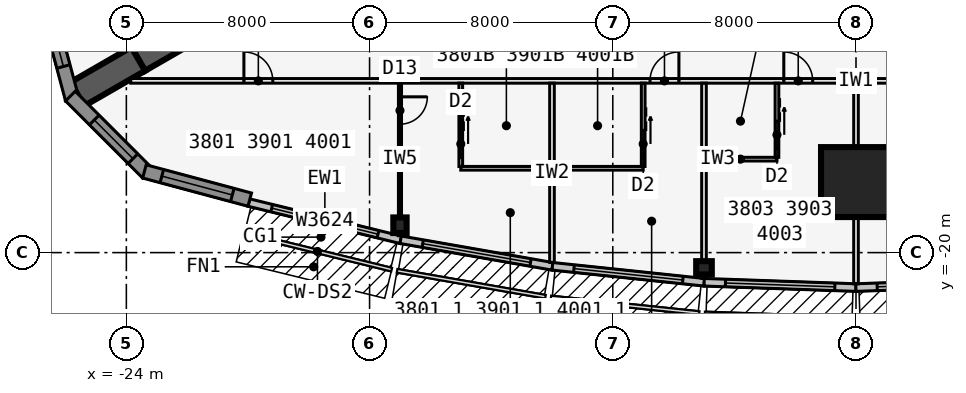
"""IFC4 building model, lengths in metres.
Left out: names, types, materials, properties, quantities, classifications, styles, units other than length and angle.
Written with IfcOpenShell. Run it as: python <this file> out.ifc"""

import sys

from ifc_helpers import new_model, si_unit, direction, frame, frame_2d, origin, origin_2d, place, context, subcontext, project, spatial, polyline, rectangle, i_section, outline, extrude, element, fill, save


model = new_model("IFC4")
c1 = context("Model", 3, precision=1e-05, world=origin(), true_north=direction((0.0, 1.0)))
c2 = subcontext(c1, "Body", "Model", "MODEL_VIEW")
j1 = project(units=[si_unit("LENGTHUNIT", "METRE"), si_unit("PLANEANGLEUNIT", "RADIAN")], contexts=[c1])
p1 = place(None, origin())
s1 = spatial("IfcSite", under=j1, at=p1, CompositionType="ELEMENT")
p2 = place(p1, origin())
s2 = spatial("IfcBuilding", under=s1, at=p2, CompositionType="ELEMENT")
p3 = place(p2, frame((0.0, 0.0, 145.3)))
s3 = spatial("IfcBuildingStorey", under=s2, at=p3, CompositionType="ELEMENT", Elevation=145.3)
for number, where, z_axis, x_axis in (
    (1, (-21.61, -12.477, 0.0), (0.0, 0.0, 1.0), (-0.866, -0.5, 0.0)),
    (2, (-23.61, -13.631, 0.0), (0.0, 0.0, 1.0), (-0.866, -0.5, 0.0)),
):
    element("IfcWall", number, at=place(p3, frame(where, z_axis=z_axis, x_axis=x_axis)), inside=s3, PredefinedType="SHEAR", context=c2, shape_type="SweptSolid", body=[
        extrude(rectangle(XDim=2.309, YDim=0.9, at=frame_2d((1.155, 0.0))), origin(), (0.0, 0.0, 1.0), 3.4),
    ])
for number, where, z_axis, x_axis in (
    (3, (-15.0, -19.1, 0.0), (0.0, 0.0, 1.0), (1.0, 0.0, 0.0)),
    (4, (-5.0, -20.5, 0.0), (0.0, 0.0, 1.0), (0.0, -1.0, 0.0)),
):
    element("IfcColumn", number, at=place(p3, frame(where, z_axis=z_axis, x_axis=x_axis)), inside=s3, PredefinedType="COLUMN", context=c2, shape_type="SweptSolid", body=[
        extrude(i_section(OverallWidth=0.437, OverallDepth=0.513, WebThickness=0.061, FlangeThickness=0.097, at=origin_2d()), origin(), (0.0, 0.0, 1.0), 3.4),
    ])
p4 = place(p3, frame((0.0, -17.68, 0.0), z_axis=(0.0, 0.0, 1.0), x_axis=(0.0, -1.0, 0.0)))
e5 = element("IfcColumn", 5, at=p4, inside=s3, PredefinedType="COLUMN", context=c2, shape_type="SweptSolid", body=[
    extrude(rectangle(XDim=2.3, YDim=2.3, at=origin_2d()), origin(), (0.0, 0.0, 1.0), 3.4),
])
p5 = place(p3, frame((-19.97, -18.354, 0.0), z_axis=(0.0, 0.0, 1.0), x_axis=(0.971270024053, -0.237980126011, 0.0)))
e6 = element("IfcWall", 6, at=p5, inside=s3, PredefinedType="STANDARD", context=c2, shape_type="SweptSolid", body=[
    extrude(rectangle(XDim=5.148, YDim=0.25, at=frame_2d((2.574, 0.0))), origin(), (0.0, 0.0, 1.0), 3.235),
])
p6 = place(p5, frame((0.774, 0.0, 0.45)))
e7 = element("IfcOpeningElement", 7, at=p6, cuts=e6, PredefinedType="OPENING", context=c2, shape_type="SweptSolid", body=[
    extrude(rectangle(XDim=3.6, YDim=2.4, at=frame_2d((1.8, 1.2))), frame((0.0, 0.135, 0.0), z_axis=(0.0, -1.0, 0.0), x_axis=(1.0, 0.0, 0.0)), (0.0, 0.0, 1.0), 0.27),
])
p7 = place(p3, frame((-14.979, -19.577, 0.0), z_axis=(0.0, 0.0, 1.0), x_axis=(0.985030467156, -0.172380331752, 0.0)))
e8 = element("IfcWall", 8, at=p7, inside=s3, PredefinedType="STANDARD", context=c2, shape_type="SweptSolid", body=[
    extrude(rectangle(XDim=5.076, YDim=0.25, at=frame_2d((2.538, 0.0))), origin(), (0.0, 0.0, 1.0), 3.235),
])
p8 = place(p7, frame((0.738, 0.0, 0.45)))
e9 = element("IfcOpeningElement", 9, at=p8, cuts=e8, PredefinedType="OPENING", context=c2, shape_type="SweptSolid", body=[
    extrude(rectangle(XDim=3.6, YDim=2.4, at=frame_2d((1.8, 1.2))), frame((0.0, 0.135, 0.0), z_axis=(0.0, -1.0, 0.0), x_axis=(1.0, 0.0, 0.0)), (0.0, 0.0, 1.0), 0.27),
])
p9 = place(p3, frame((-9.987, -20.451, 0.0), z_axis=(0.0, 0.0, 1.0), x_axis=(0.994534683851, -0.104406717299, 0.0)))
e10 = element("IfcWall", 10, at=p9, inside=s3, PredefinedType="STANDARD", context=c2, shape_type="SweptSolid", body=[
    extrude(rectangle(XDim=5.028, YDim=0.25, at=frame_2d((2.514, 0.0))), origin(), (0.0, 0.0, 1.0), 3.235),
])
p10 = place(p9, frame((0.714, 0.0, 0.45)))
e11 = element("IfcOpeningElement", 11, at=p10, cuts=e10, PredefinedType="OPENING", context=c2, shape_type="SweptSolid", body=[
    extrude(rectangle(XDim=3.6, YDim=2.4, at=frame_2d((1.8, 1.2))), frame((0.0, 0.135, 0.0), z_axis=(0.0, -1.0, 0.0), x_axis=(1.0, 0.0, 0.0)), (0.0, 0.0, 1.0), 0.27),
])
p11 = place(p3, frame((-4.996, -20.975, 0.0), z_axis=(0.0, 0.0, 1.0), x_axis=(0.999387720943, -0.034988329879, 0.0)))
e12 = element("IfcWall", 12, at=p11, inside=s3, PredefinedType="STANDARD", context=c2, shape_type="SweptSolid", body=[
    extrude(rectangle(XDim=5.003, YDim=0.25, at=frame_2d((2.501, 0.0))), origin(), (0.0, 0.0, 1.0), 3.235),
])
p12 = place(p11, frame((0.701, 0.0, 0.45)))
e13 = element("IfcOpeningElement", 13, at=p12, cuts=e12, PredefinedType="OPENING", context=c2, shape_type="SweptSolid", body=[
    extrude(rectangle(XDim=3.6, YDim=2.4, at=frame_2d((1.8, 1.2))), frame((0.0, 0.135, 0.0), z_axis=(0.0, -1.0, 0.0), x_axis=(1.0, 0.0, 0.0)), (0.0, 0.0, 1.0), 0.27),
])
p13 = place(p3, frame((-0.004, -21.15, 0.0), z_axis=(0.0, 0.0, 1.0), x_axis=(0.999387720943, 0.034988329879, 0.0)))
e14 = element("IfcWall", 14, at=p13, inside=s3, PredefinedType="STANDARD", context=c2, shape_type="SweptSolid", body=[
    extrude(rectangle(XDim=5.003, YDim=0.25, at=frame_2d((2.501, 0.0))), origin(), (0.0, 0.0, 1.0), 3.235),
])
p14 = place(p13, frame((0.701, 0.0, 0.45)))
e15 = element("IfcOpeningElement", 15, at=p14, cuts=e14, PredefinedType="OPENING", context=c2, shape_type="SweptSolid", body=[
    extrude(rectangle(XDim=3.6, YDim=2.4, at=frame_2d((1.8, 1.2))), frame((0.0, 0.135, 0.0), z_axis=(0.0, -1.0, 0.0), x_axis=(1.0, 0.0, 0.0)), (0.0, 0.0, 1.0), 0.27),
])
p15 = place(p3, frame((-26.711, -11.489, 0.0), z_axis=(0.0, 0.0, 1.0), x_axis=(0.258823421857, -0.965924653531, 0.0)))
e16 = element("IfcWall", 16, at=p15, inside=s3, PredefinedType="SOLIDWALL", context=c2, shape_type="SweptSolid", body=[
    extrude(outline(polyline([(3.586, 0.225), (3.527, 0.225), (3.035, 0.093), (3.0, 0.225), (0.0, 0.225), (0.0, -0.225), (3.586, -0.225), (3.586, 0.225)])), origin(), (0.0, 0.0, 1.0), 3.235),
])
p16 = place(p15, frame((0.675, 0.0, 0.45)))
e17 = element("IfcOpeningElement", 17, at=p16, cuts=e16, PredefinedType="OPENING", context=c2, shape_type="SweptSolid", body=[
    extrude(rectangle(XDim=1.8, YDim=2.4, at=frame_2d((0.9, 1.2))), frame((0.0, 0.235, 0.0), z_axis=(0.0, -1.0, 0.0), x_axis=(1.0, 0.0, 0.0)), (0.0, 0.0, 1.0), 0.47),
])
p17 = place(p3, frame((-25.841, -14.852, 0.0), z_axis=(0.0, 0.0, 1.0), x_axis=(0.707106781187, -0.707106781187, 0.0)))
e18 = element("IfcWall", 18, at=p17, inside=s3, PredefinedType="SOLIDWALL", context=c2, shape_type="SweptSolid", body=[
    extrude(outline(polyline([(3.586, 0.225), (0.586, 0.225), (0.551, 0.093), (0.059, 0.225), (0.0, 0.225), (0.0, -0.225), (3.586, -0.225), (3.586, 0.225)])), origin(), (0.0, 0.0, 1.0), 3.235),
])
p18 = place(p17, frame((1.111, 0.0, 0.45)))
e19 = element("IfcOpeningElement", 19, at=p18, cuts=e18, PredefinedType="OPENING", context=c2, shape_type="SweptSolid", body=[
    extrude(rectangle(XDim=1.8, YDim=2.4, at=frame_2d((0.9, 1.2))), frame((0.0, 0.235, 0.0), z_axis=(0.0, -1.0, 0.0), x_axis=(1.0, 0.0, 0.0)), (0.0, 0.0, 1.0), 0.47),
])
p19 = place(p3, frame((-23.406, -17.33, 0.0), z_axis=(0.0, 0.0, 1.0), x_axis=(0.965924653531, -0.258823421857, 0.0)))
e20 = element("IfcWall", 20, at=p19, inside=s3, PredefinedType="SOLIDWALL", context=c2, shape_type="SweptSolid", body=[
    extrude(rectangle(XDim=3.586, YDim=0.45, at=frame_2d((1.793, 0.0))), origin(), (0.0, 0.0, 1.0), 3.235),
])
p20 = place(p19, frame((0.593, 0.0, 0.45)))
e21 = element("IfcOpeningElement", 21, at=p20, cuts=e20, PredefinedType="OPENING", context=c2, shape_type="SweptSolid", body=[
    extrude(rectangle(XDim=2.4, YDim=2.4, at=frame_2d((1.2, 1.2))), frame((0.0, 0.235, 0.0), z_axis=(0.0, -1.0, 0.0), x_axis=(1.0, 0.0, 0.0)), (0.0, 0.0, 1.0), 0.47),
])
p21 = place(p3, frame((-23.857, -14.351, 0.0), z_axis=(0.0, 0.0, 1.0), x_axis=(1.0, 0.0, 0.0)))
e22 = element("IfcWall", 22, at=p21, inside=s3, PredefinedType="PARTITIONING", context=c2, shape_type="SweptSolid", body=[
    extrude(rectangle(XDim=47.714, YDim=0.15, at=frame_2d((23.857, 0.0))), origin(), (0.0, 0.0, 1.0), 3.235),
])
p22 = place(p21, frame((3.723, 0.0, 0.0)))
e23 = element("IfcOpeningElement", 23, at=p22, cuts=e22, PredefinedType="OPENING", context=c2, shape_type="SweptSolid", body=[
    extrude(rectangle(XDim=0.95, YDim=2.13, at=frame_2d((0.475, 1.065))), frame((0.0, 0.085, 0.0), z_axis=(0.0, -1.0, 0.0), x_axis=(1.0, 0.0, 0.0)), (0.0, 0.0, 1.0), 0.17),
])
p23 = place(p21, frame((17.082, 0.0, 0.0)))
e24 = element("IfcOpeningElement", 24, at=p23, cuts=e22, PredefinedType="OPENING", context=c2, shape_type="SweptSolid", body=[
    extrude(rectangle(XDim=0.95, YDim=2.13, at=frame_2d((0.475, 1.065))), frame((0.0, 0.085, 0.0), z_axis=(0.0, -1.0, 0.0), x_axis=(1.0, 0.0, 0.0)), (0.0, 0.0, 1.0), 0.17),
])
p24 = place(p21, frame((21.482, 0.0, 0.0)))
e25 = element("IfcOpeningElement", 25, at=p24, cuts=e22, PredefinedType="OPENING", context=c2, shape_type="SweptSolid", body=[
    extrude(rectangle(XDim=0.95, YDim=2.13, at=frame_2d((0.475, 1.065))), frame((0.0, 0.085, 0.0), z_axis=(0.0, -1.0, 0.0), x_axis=(1.0, 0.0, 0.0)), (0.0, 0.0, 1.0), 0.17),
])
p25 = place(p21, frame((25.857, 0.0, 0.0)))
e26 = element("IfcOpeningElement", 26, at=p25, cuts=e22, PredefinedType="OPENING", context=c2, shape_type="SweptSolid", body=[
    extrude(rectangle(XDim=1.0, YDim=2.13, at=frame_2d((0.5, 1.065))), frame((0.0, 0.085, 0.0), z_axis=(0.0, -1.0, 0.0), x_axis=(1.0, 0.0, 0.0)), (0.0, 0.0, 1.0), 0.17),
])
p26 = place(p21, frame((31.482, 0.0, 0.0)))
e27 = element("IfcOpeningElement", 27, at=p26, cuts=e22, PredefinedType="OPENING", context=c2, shape_type="SweptSolid", body=[
    extrude(rectangle(XDim=0.95, YDim=2.13, at=frame_2d((0.475, 1.065))), frame((0.0, 0.085, 0.0), z_axis=(0.0, -1.0, 0.0), x_axis=(1.0, 0.0, 0.0)), (0.0, 0.0, 1.0), 0.17),
])
p27 = place(p21, frame((36.482, 0.0, 0.0)))
e28 = element("IfcOpeningElement", 28, at=p27, cuts=e22, PredefinedType="OPENING", context=c2, shape_type="SweptSolid", body=[
    extrude(rectangle(XDim=0.95, YDim=2.13, at=frame_2d((0.475, 1.065))), frame((0.0, 0.085, 0.0), z_axis=(0.0, -1.0, 0.0), x_axis=(1.0, 0.0, 0.0)), (0.0, 0.0, 1.0), 0.17),
])
p28 = place(p21, frame((42.082, 0.0, 0.0)))
e29 = element("IfcOpeningElement", 29, at=p28, cuts=e22, PredefinedType="OPENING", context=c2, shape_type="SweptSolid", body=[
    extrude(rectangle(XDim=0.95, YDim=2.13, at=frame_2d((0.475, 1.065))), frame((0.0, 0.085, 0.0), z_axis=(0.0, -1.0, 0.0), x_axis=(1.0, 0.0, 0.0)), (0.0, 0.0, 1.0), 0.17),
])
p29 = place(p3, frame((-15.0, -14.426, 0.0), z_axis=(0.0, 0.0, 1.0), x_axis=(0.0, -1.0, 0.0)))
e30 = element("IfcWall", 30, at=p29, inside=s3, PredefinedType="PARTITIONING", context=c2, shape_type="SweptSolid", body=[
    extrude(rectangle(XDim=5.017, YDim=0.1, at=frame_2d((2.508, 0.0))), origin(), (0.0, 0.0, 1.0), 2.389),
])
p30 = place(p29, frame((0.45, 0.0, 0.0)))
e31 = element("IfcOpeningElement", 31, at=p30, cuts=e30, PredefinedType="OPENING", context=c2, shape_type="SweptSolid", body=[
    extrude(rectangle(XDim=0.9, YDim=2.13, at=frame_2d((0.45, 1.065))), frame((0.0, 0.06, 0.0), z_axis=(0.0, -1.0, 0.0), x_axis=(1.0, 0.0, 0.0)), (0.0, 0.0, 1.0), 0.12),
])
p31 = place(p3, frame((-10.0, -14.426, 0.0), z_axis=(0.0, 0.0, 1.0), x_axis=(0.0, -1.0, 0.0)))
e32 = element("IfcWall", 32, at=p31, inside=s3, PredefinedType="PARTITIONING", context=c2, shape_type="SweptSolid", body=[
    extrude(rectangle(XDim=5.895, YDim=0.15, at=frame_2d((2.948, 0.0))), origin(), (0.0, 0.0, 1.0), 2.389),
])
p32 = place(p3, frame((-5.0, -14.426, 0.0), z_axis=(0.0, 0.0, 1.0), x_axis=(0.0, -1.0, 0.0)))
e33 = element("IfcWall", 33, at=p32, inside=s3, PredefinedType="PARTITIONING", context=c2, shape_type="SweptSolid", body=[
    extrude(rectangle(XDim=6.423, YDim=0.15, at=frame_2d((3.211, 0.0))), origin(), (0.0, 0.0, 1.0), 2.389),
])
p33 = place(p3, frame((0.0, -14.426, 0.0), z_axis=(0.0, 0.0, 1.0), x_axis=(0.0, -1.0, 0.0)))
e34 = element("IfcWall", 34, at=p33, inside=s3, PredefinedType="PARTITIONING", context=c2, shape_type="SweptSolid", body=[
    extrude(rectangle(XDim=6.599, YDim=0.15, at=frame_2d((3.299, 0.0))), origin(), (0.0, 0.0, 1.0), 2.389),
])
p34 = place(p3, frame((-13.0, -17.226, 0.0), z_axis=(0.0, 0.0, 1.0), x_axis=(1.0, 0.0, 0.0)))
e35 = element("IfcWall", 35, at=p34, inside=s3, PredefinedType="PLUMBINGWALL", context=c2, shape_type="SweptSolid", body=[
    extrude(rectangle(XDim=3.0, YDim=0.12, at=frame_2d((1.5, 0.0))), origin(), (0.0, 0.0, 1.0), 3.235),
])
p35 = place(p3, frame((-13.0, -14.426, 0.0), z_axis=(0.0, 0.0, 1.0), x_axis=(0.0, -1.0, 0.0)))
e36 = element("IfcWall", 36, at=p35, inside=s3, PredefinedType="PLUMBINGWALL", context=c2, shape_type="SweptSolid", body=[
    extrude(rectangle(XDim=2.74, YDim=0.12, at=frame_2d((1.37, 0.0))), origin(), (0.0, 0.0, 1.0), 3.235),
])
p36 = place(p35, frame((1.55, 0.0, 0.0)))
e37 = element("IfcOpeningElement", 37, at=p36, cuts=e36, PredefinedType="OPENING", context=c2, shape_type="SweptSolid", body=[
    extrude(rectangle(XDim=0.9, YDim=2.13, at=frame_2d((0.45, 1.065))), frame((0.0, 0.07, 0.0), z_axis=(0.0, -1.0, 0.0), x_axis=(1.0, 0.0, 0.0)), (0.0, 0.0, 1.0), 0.14),
])
p37 = place(p3, frame((-10.0, -17.226, 0.0), z_axis=(0.0, 0.0, 1.0), x_axis=(1.0, 0.0, 0.0)))
e38 = element("IfcWall", 38, at=p37, inside=s3, PredefinedType="PLUMBINGWALL", context=c2, shape_type="SweptSolid", body=[
    extrude(rectangle(XDim=3.0, YDim=0.12, at=frame_2d((1.5, 0.0))), origin(), (0.0, 0.0, 1.0), 3.235),
])
p38 = place(p3, frame((-7.0, -14.426, 0.0), z_axis=(0.0, 0.0, 1.0), x_axis=(0.0, -1.0, 0.0)))
e39 = element("IfcWall", 39, at=p38, inside=s3, PredefinedType="PLUMBINGWALL", context=c2, shape_type="SweptSolid", body=[
    extrude(rectangle(XDim=2.74, YDim=0.12, at=frame_2d((1.37, 0.0))), origin(), (0.0, 0.0, 1.0), 3.235),
])
p39 = place(p38, frame((1.55, 0.0, 0.0)))
e40 = element("IfcOpeningElement", 40, at=p39, cuts=e39, PredefinedType="OPENING", context=c2, shape_type="SweptSolid", body=[
    extrude(rectangle(XDim=0.9, YDim=2.13, at=frame_2d((0.45, 1.065))), frame((0.0, 0.07, 0.0), z_axis=(0.0, -1.0, 0.0), x_axis=(1.0, 0.0, 0.0)), (0.0, 0.0, 1.0), 0.14),
])
p40 = place(p3, frame((-5.0, -16.926, 0.0), z_axis=(0.0, 0.0, 1.0), x_axis=(1.0, 0.0, 0.0)))
e41 = element("IfcWall", 41, at=p40, inside=s3, PredefinedType="PLUMBINGWALL", context=c2, shape_type="SweptSolid", body=[
    extrude(rectangle(XDim=2.4, YDim=0.12, at=frame_2d((1.2, 0.0))), origin(), (0.0, 0.0, 1.0), 3.235),
])
p41 = place(p3, frame((-2.6, -14.426, 0.0), z_axis=(0.0, 0.0, 1.0), x_axis=(0.0, -1.0, 0.0)))
e42 = element("IfcWall", 42, at=p41, inside=s3, PredefinedType="PLUMBINGWALL", context=c2, shape_type="SweptSolid", body=[
    extrude(rectangle(XDim=2.44, YDim=0.12, at=frame_2d((1.22, 0.0))), origin(), (0.0, 0.0, 1.0), 3.235),
])
p42 = place(p41, frame((1.25, 0.0, 0.0)))
e43 = element("IfcOpeningElement", 43, at=p42, cuts=e42, PredefinedType="OPENING", context=c2, shape_type="SweptSolid", body=[
    extrude(rectangle(XDim=0.9, YDim=2.13, at=frame_2d((0.45, 1.065))), frame((0.0, 0.07, 0.0), z_axis=(0.0, -1.0, 0.0), x_axis=(1.0, 0.0, 0.0)), (0.0, 0.0, 1.0), 0.14),
])
p43 = place(p6, origin())
e44 = element("IfcWindow", 44, at=p43, inside=s3, PartitioningType="SINGLE_PANEL", PredefinedType="WINDOW", context=c2, shape_type="SweptSolid", body=[
    extrude(rectangle(XDim=3.6, YDim=2.4, at=frame_2d((1.8, 1.2))), frame((0.0, 0.03, 0.0), z_axis=(0.0, -1.0, 0.0), x_axis=(1.0, 0.0, 0.0)), (0.0, 0.0, 1.0), 0.06),
])
fill(e7, e44)
p44 = place(p8, origin())
e45 = element("IfcWindow", 45, at=p44, inside=s3, PartitioningType="SINGLE_PANEL", PredefinedType="WINDOW", context=c2, shape_type="SweptSolid", body=[
    extrude(rectangle(XDim=3.6, YDim=2.4, at=frame_2d((1.8, 1.2))), frame((0.0, 0.03, 0.0), z_axis=(0.0, -1.0, 0.0), x_axis=(1.0, 0.0, 0.0)), (0.0, 0.0, 1.0), 0.06),
])
fill(e9, e45)
p45 = place(p10, origin())
e46 = element("IfcWindow", 46, at=p45, inside=s3, PartitioningType="SINGLE_PANEL", PredefinedType="WINDOW", context=c2, shape_type="SweptSolid", body=[
    extrude(rectangle(XDim=3.6, YDim=2.4, at=frame_2d((1.8, 1.2))), frame((0.0, 0.03, 0.0), z_axis=(0.0, -1.0, 0.0), x_axis=(1.0, 0.0, 0.0)), (0.0, 0.0, 1.0), 0.06),
])
fill(e11, e46)
p46 = place(p12, origin())
e47 = element("IfcWindow", 47, at=p46, inside=s3, PartitioningType="SINGLE_PANEL", PredefinedType="WINDOW", context=c2, shape_type="SweptSolid", body=[
    extrude(rectangle(XDim=3.6, YDim=2.4, at=frame_2d((1.8, 1.2))), frame((0.0, 0.03, 0.0), z_axis=(0.0, -1.0, 0.0), x_axis=(1.0, 0.0, 0.0)), (0.0, 0.0, 1.0), 0.06),
])
fill(e13, e47)
p47 = place(p14, origin())
e48 = element("IfcWindow", 48, at=p47, inside=s3, PartitioningType="SINGLE_PANEL", PredefinedType="WINDOW", context=c2, shape_type="SweptSolid", body=[
    extrude(rectangle(XDim=3.6, YDim=2.4, at=frame_2d((1.8, 1.2))), frame((0.0, 0.03, 0.0), z_axis=(0.0, -1.0, 0.0), x_axis=(1.0, 0.0, 0.0)), (0.0, 0.0, 1.0), 0.06),
])
fill(e15, e48)
p48 = place(p16, origin())
e49 = element("IfcWindow", 49, at=p48, inside=s3, PartitioningType="SINGLE_PANEL", PredefinedType="WINDOW", context=c2, shape_type="SweptSolid", body=[
    extrude(rectangle(XDim=1.8, YDim=2.4, at=frame_2d((0.9, 1.2))), frame((0.0, 0.03, 0.0), z_axis=(0.0, -1.0, 0.0), x_axis=(1.0, 0.0, 0.0)), (0.0, 0.0, 1.0), 0.06),
])
fill(e17, e49)
p49 = place(p18, origin())
e50 = element("IfcWindow", 50, at=p49, inside=s3, PartitioningType="SINGLE_PANEL", PredefinedType="WINDOW", context=c2, shape_type="SweptSolid", body=[
    extrude(rectangle(XDim=1.8, YDim=2.4, at=frame_2d((0.9, 1.2))), frame((0.0, 0.03, 0.0), z_axis=(0.0, -1.0, 0.0), x_axis=(1.0, 0.0, 0.0)), (0.0, 0.0, 1.0), 0.06),
])
fill(e19, e50)
p50 = place(p20, origin())
e51 = element("IfcWindow", 51, at=p50, inside=s3, PartitioningType="SINGLE_PANEL", PredefinedType="WINDOW", context=c2, shape_type="SweptSolid", body=[
    extrude(rectangle(XDim=2.4, YDim=2.4, at=frame_2d((1.2, 1.2))), frame((0.0, 0.03, 0.0), z_axis=(0.0, -1.0, 0.0), x_axis=(1.0, 0.0, 0.0)), (0.0, 0.0, 1.0), 0.06),
])
fill(e21, e51)
p51 = place(p30, origin())
e52 = element("IfcDoor", 52, at=p51, inside=s3, OperationType="SINGLE_SWING_LEFT", PredefinedType="DOOR", context=c2, shape_type="SweptSolid", body=[
    extrude(rectangle(XDim=0.9, YDim=2.13, at=frame_2d((0.45, 1.065))), frame((0.0, 0.025, 0.0), z_axis=(0.0, -1.0, 0.0), x_axis=(1.0, 0.0, 0.0)), (0.0, 0.0, 1.0), 0.05),
])
fill(e31, e52)
p52 = place(p22, origin())
e53 = element("IfcDoor", 53, at=p52, inside=s3, OperationType="SINGLE_SWING_LEFT", PredefinedType="DOOR", context=c2, shape_type="SweptSolid", body=[
    extrude(rectangle(XDim=0.95, YDim=2.13, at=frame_2d((0.475, 1.065))), frame((0.0, 0.025, 0.0), z_axis=(0.0, -1.0, 0.0), x_axis=(1.0, 0.0, 0.0)), (0.0, 0.0, 1.0), 0.05),
])
fill(e23, e53)
p53 = place(p36, origin())
e54 = element("IfcDoor", 54, at=p53, inside=s3, OperationType="SLIDING_TO_LEFT", PredefinedType="DOOR", context=c2, shape_type="SweptSolid", body=[
    extrude(rectangle(XDim=0.9, YDim=2.13, at=frame_2d((0.45, 1.065))), frame((0.0, 0.025, 0.0), z_axis=(0.0, -1.0, 0.0), x_axis=(1.0, 0.0, 0.0)), (0.0, 0.0, 1.0), 0.05),
])
fill(e37, e54)
p54 = place(p39, origin())
e55 = element("IfcDoor", 55, at=p54, inside=s3, OperationType="SLIDING_TO_LEFT", PredefinedType="DOOR", context=c2, shape_type="SweptSolid", body=[
    extrude(rectangle(XDim=0.9, YDim=2.13, at=frame_2d((0.45, 1.065))), frame((0.0, 0.025, 0.0), z_axis=(0.0, -1.0, 0.0), x_axis=(1.0, 0.0, 0.0)), (0.0, 0.0, 1.0), 0.05),
])
fill(e40, e55)
p55 = place(p23, origin())
e56 = element("IfcDoor", 56, at=p55, inside=s3, OperationType="SINGLE_SWING_RIGHT", PredefinedType="DOOR", context=c2, shape_type="SweptSolid", body=[
    extrude(rectangle(XDim=0.95, YDim=2.13, at=frame_2d((0.475, 1.065))), frame((0.0, 0.025, 0.0), z_axis=(0.0, -1.0, 0.0), x_axis=(1.0, 0.0, 0.0)), (0.0, 0.0, 1.0), 0.05),
])
fill(e24, e56)
p56 = place(p42, origin())
e57 = element("IfcDoor", 57, at=p56, inside=s3, OperationType="SLIDING_TO_LEFT", PredefinedType="DOOR", context=c2, shape_type="SweptSolid", body=[
    extrude(rectangle(XDim=0.9, YDim=2.13, at=frame_2d((0.45, 1.065))), frame((0.0, 0.025, 0.0), z_axis=(0.0, -1.0, 0.0), x_axis=(1.0, 0.0, 0.0)), (0.0, 0.0, 1.0), 0.05),
])
fill(e43, e57)
p57 = place(p24, origin())
e58 = element("IfcDoor", 58, at=p57, inside=s3, OperationType="SINGLE_SWING_LEFT", PredefinedType="DOOR", context=c2, shape_type="SweptSolid", body=[
    extrude(rectangle(XDim=0.95, YDim=2.13, at=frame_2d((0.475, 1.065))), frame((0.0, 0.025, 0.0), z_axis=(0.0, -1.0, 0.0), x_axis=(1.0, 0.0, 0.0)), (0.0, 0.0, 1.0), 0.05),
])
fill(e25, e58)
save(model, sys.argv[1])
